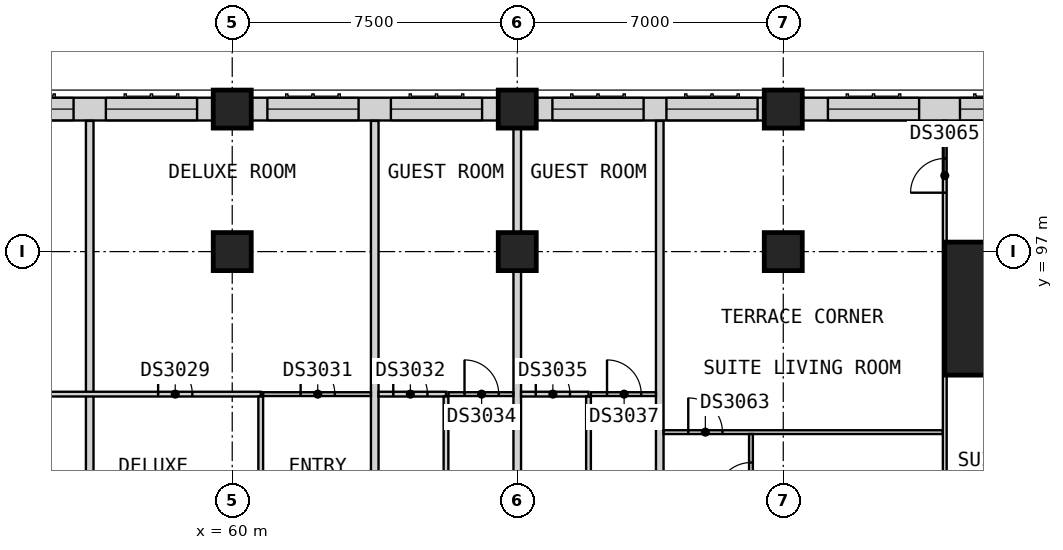
"""IFC4 building model, lengths in metres.
Left out: names, types, materials, properties, quantities, classifications, styles, units other than length and angle.
Written with IfcOpenShell. Run it as: python <this file> out.ifc"""

import sys

from ifc_helpers import new_model, si_unit, direction, frame, frame_2d, origin, origin_2d, place, context, subcontext, project, spatial, rectangle, extrude, element, fill, save


model = new_model("IFC4")
c1 = context("Model", 3, precision=1e-05, world=origin(), true_north=direction((0.0, 1.0)))
c2 = subcontext(c1, "Body", "Model", "MODEL_VIEW")
j1 = project(units=[si_unit("LENGTHUNIT", "METRE"), si_unit("PLANEANGLEUNIT", "RADIAN")], contexts=[c1])
p1 = place(None, origin())
s1 = spatial("IfcSite", under=j1, at=p1, CompositionType="ELEMENT")
p2 = place(p1, origin())
s2 = spatial("IfcBuilding", under=s1, at=p2, CompositionType="ELEMENT")
p3 = place(p2, frame((0.0, 0.0, 137.4)))
s3 = spatial("IfcBuildingStorey", under=s2, at=p3, CompositionType="ELEMENT", Elevation=137.4)
for number, where, z_axis, x_axis in (
    (1, (60.0, 100.75, 0.0), (0.0, 0.0, 1.0), (1.0, 0.0, 0.0)),
    (2, (67.5, 100.75, 0.0), (0.0, 0.0, 1.0), (1.0, 0.0, 0.0)),
    (3, (74.5, 100.75, 0.0), (0.0, 0.0, 1.0), (1.0, 0.0, 0.0)),
    (4, (60.0, 97.0, 0.0), (0.0, 0.0, 1.0), (1.0, 0.0, 0.0)),
    (5, (67.5, 97.0, 0.0), (0.0, 0.0, 1.0), (1.0, 0.0, 0.0)),
    (6, (74.5, 97.0, 0.0), (0.0, 0.0, 1.0), (1.0, 0.0, 0.0)),
):
    element("IfcColumn", number, at=place(p3, frame(where, z_axis=z_axis, x_axis=x_axis)), inside=s3, PredefinedType="COLUMN", context=c2, shape_type="SweptSolid", body=[
        extrude(rectangle(XDim=1.0, YDim=1.0, at=origin_2d()), origin(), (0.0, 0.0, 1.0), 3.6),
    ])
p4 = place(p3, frame((80.5, 95.5, 0.0), z_axis=(0.0, 0.0, 1.0), x_axis=(1.0, 0.0, 0.0)))
e7 = element("IfcColumn", 7, at=p4, inside=s3, PredefinedType="COLUMN", context=c2, shape_type="SweptSolid", body=[
    extrude(rectangle(XDim=3.5, YDim=3.5, at=origin_2d()), origin(), (0.0, 0.0, 1.0), 3.6),
])
p5 = place(p3, frame((82.25, 100.75, 0.0), z_axis=(0.0, 0.0, 1.0), x_axis=(-1.0, 0.0, 0.0)))
e8 = element("IfcWall", 8, at=p5, inside=s3, PredefinedType="SOLIDWALL", context=c2, shape_type="SweptSolid", body=[
    extrude(rectangle(XDim=7.25, YDim=0.6, at=frame_2d((3.625, 0.0))), origin(), (0.0, 0.0, 1.0), 2.85),
])
p6 = place(p5, frame((4.175, 0.0, 0.8)))
e9 = element("IfcOpeningElement", 9, at=p6, cuts=e8, PredefinedType="OPENING", context=c2, shape_type="SweptSolid", body=[
    extrude(rectangle(XDim=2.4, YDim=1.8, at=frame_2d((1.2, 0.9))), frame((0.0, 0.31, 0.0), z_axis=(0.0, -1.0, 0.0), x_axis=(1.0, 0.0, 0.0)), (0.0, 0.0, 1.0), 0.62),
])
p7 = place(p5, frame((1.3, 0.0, 0.8)))
e10 = element("IfcOpeningElement", 10, at=p7, cuts=e8, PredefinedType="OPENING", context=c2, shape_type="SweptSolid", body=[
    extrude(rectangle(XDim=1.8, YDim=1.8, at=frame_2d((0.9, 0.9))), frame((0.0, 0.31, 0.0), z_axis=(0.0, -1.0, 0.0), x_axis=(1.0, 0.0, 0.0)), (0.0, 0.0, 1.0), 0.62),
])
p8 = place(p3, frame((74.0, 100.75, 0.0), z_axis=(0.0, 0.0, 1.0), x_axis=(-1.0, 0.0, 0.0)))
e11 = element("IfcWall", 11, at=p8, inside=s3, PredefinedType="SOLIDWALL", context=c2, shape_type="SweptSolid", body=[
    extrude(rectangle(XDim=6.0, YDim=0.6, at=frame_2d((3.0, 0.0))), origin(), (0.0, 0.0, 1.0), 2.85),
])
p9 = place(p8, frame((3.175, 0.0, 0.8)))
e12 = element("IfcOpeningElement", 12, at=p9, cuts=e11, PredefinedType="OPENING", context=c2, shape_type="SweptSolid", body=[
    extrude(rectangle(XDim=2.4, YDim=1.8, at=frame_2d((1.2, 0.9))), frame((0.0, 0.31, 0.0), z_axis=(0.0, -1.0, 0.0), x_axis=(1.0, 0.0, 0.0)), (0.0, 0.0, 1.0), 0.62),
])
p10 = place(p8, frame((0.175, 0.0, 0.8)))
e13 = element("IfcOpeningElement", 13, at=p10, cuts=e11, PredefinedType="OPENING", context=c2, shape_type="SweptSolid", body=[
    extrude(rectangle(XDim=2.4, YDim=1.8, at=frame_2d((1.2, 0.9))), frame((0.0, 0.31, 0.0), z_axis=(0.0, -1.0, 0.0), x_axis=(1.0, 0.0, 0.0)), (0.0, 0.0, 1.0), 0.62),
])
p11 = place(p3, frame((67.0, 100.75, 0.0), z_axis=(0.0, 0.0, 1.0), x_axis=(-1.0, 0.0, 0.0)))
e14 = element("IfcWall", 14, at=p11, inside=s3, PredefinedType="SOLIDWALL", context=c2, shape_type="SweptSolid", body=[
    extrude(rectangle(XDim=6.5, YDim=0.6, at=frame_2d((3.25, 0.0))), origin(), (0.0, 0.0, 1.0), 2.85),
])
p12 = place(p11, frame((3.675, 0.0, 0.8)))
e15 = element("IfcOpeningElement", 15, at=p12, cuts=e14, PredefinedType="OPENING", context=c2, shape_type="SweptSolid", body=[
    extrude(rectangle(XDim=2.4, YDim=1.8, at=frame_2d((1.2, 0.9))), frame((0.0, 0.31, 0.0), z_axis=(0.0, -1.0, 0.0), x_axis=(1.0, 0.0, 0.0)), (0.0, 0.0, 1.0), 0.62),
])
p13 = place(p11, frame((0.425, 0.0, 0.8)))
e16 = element("IfcOpeningElement", 16, at=p13, cuts=e14, PredefinedType="OPENING", context=c2, shape_type="SweptSolid", body=[
    extrude(rectangle(XDim=2.4, YDim=1.8, at=frame_2d((1.2, 0.9))), frame((0.0, 0.31, 0.0), z_axis=(0.0, -1.0, 0.0), x_axis=(1.0, 0.0, 0.0)), (0.0, 0.0, 1.0), 0.62),
])
p14 = place(p3, frame((59.5, 100.75, 0.0), z_axis=(0.0, 0.0, 1.0), x_axis=(-1.0, 0.0, 0.0)))
e17 = element("IfcWall", 17, at=p14, inside=s3, PredefinedType="SOLIDWALL", context=c2, shape_type="SweptSolid", body=[
    extrude(rectangle(XDim=6.5, YDim=0.6, at=frame_2d((3.25, 0.0))), origin(), (0.0, 0.0, 1.0), 2.85),
])
p15 = place(p14, frame((3.675, 0.0, 0.8)))
e18 = element("IfcOpeningElement", 18, at=p15, cuts=e17, PredefinedType="OPENING", context=c2, shape_type="SweptSolid", body=[
    extrude(rectangle(XDim=2.4, YDim=1.8, at=frame_2d((1.2, 0.9))), frame((0.0, 0.31, 0.0), z_axis=(0.0, -1.0, 0.0), x_axis=(1.0, 0.0, 0.0)), (0.0, 0.0, 1.0), 0.62),
])
p16 = place(p14, frame((0.425, 0.0, 0.8)))
e19 = element("IfcOpeningElement", 19, at=p16, cuts=e17, PredefinedType="OPENING", context=c2, shape_type="SweptSolid", body=[
    extrude(rectangle(XDim=2.4, YDim=1.8, at=frame_2d((1.2, 0.9))), frame((0.0, 0.31, 0.0), z_axis=(0.0, -1.0, 0.0), x_axis=(1.0, 0.0, 0.0)), (0.0, 0.0, 1.0), 0.62),
])
for number, where, z_axis, x_axis in (
    (20, (56.25, 88.725, 0.0), (0.0, 0.0, 1.0), (0.0, 1.0, 0.0)),
    (21, (63.75, 88.725, 0.0), (0.0, 0.0, 1.0), (0.0, 1.0, 0.0)),
):
    element("IfcWall", number, at=place(p3, frame(where, z_axis=z_axis, x_axis=x_axis)), inside=s3, PredefinedType="PARTITIONING", context=c2, shape_type="SweptSolid", body=[
        extrude(rectangle(XDim=11.715, YDim=0.2, at=frame_2d((5.857, 0.0))), origin(), (0.0, 0.0, 1.0), 3.35),
    ])
p17 = place(p3, frame((67.5, 88.725, 0.0), z_axis=(0.0, 0.0, 1.0), x_axis=(0.0, 1.0, 0.0)))
e22 = element("IfcWall", 22, at=p17, inside=s3, PredefinedType="PARTITIONING", context=c2, shape_type="SweptSolid", body=[
    extrude(rectangle(XDim=12.525, YDim=0.2, at=frame_2d((6.262, 0.0))), origin(), (0.0, 0.0, 1.0), 3.35),
])
p18 = place(p3, frame((71.25, 88.725, 0.0), z_axis=(0.0, 0.0, 1.0), x_axis=(0.0, 1.0, 0.0)))
e23 = element("IfcWall", 23, at=p18, inside=s3, PredefinedType="PARTITIONING", context=c2, shape_type="SweptSolid", body=[
    extrude(rectangle(XDim=11.715, YDim=0.2, at=frame_2d((5.857, 0.0))), origin(), (0.0, 0.0, 1.0), 3.35),
])
p19 = place(p3, frame((71.35, 92.25, 0.0), z_axis=(0.0, 0.0, 1.0), x_axis=(1.0, 0.0, 0.0)))
e24 = element("IfcWall", 24, at=p19, inside=s3, PredefinedType="PARTITIONING", context=c2, shape_type="SweptSolid", body=[
    extrude(rectangle(XDim=7.35, YDim=0.1, at=frame_2d((3.675, 0.0))), origin(), (0.0, 0.0, 1.0), 3.35),
])
p20 = place(p19, frame((0.65, 0.0, 0.0)))
e25 = element("IfcOpeningElement", 25, at=p20, cuts=e24, PredefinedType="OPENING", context=c2, shape_type="SweptSolid", body=[
    extrude(rectangle(XDim=0.9, YDim=2.1, at=frame_2d((0.45, 1.05))), frame((0.0, 0.06, 0.0), z_axis=(0.0, -1.0, 0.0), x_axis=(1.0, 0.0, 0.0)), (0.0, 0.0, 1.0), 0.12),
])
p21 = place(p3, frame((60.812, 93.25, 0.0), z_axis=(0.0, 0.0, 1.0), x_axis=(1.0, 0.0, 0.0)))
e26 = element("IfcWall", 26, at=p21, inside=s3, PredefinedType="PARTITIONING", context=c2, shape_type="SweptSolid", body=[
    extrude(rectangle(XDim=2.837, YDim=0.1, at=frame_2d((1.419, 0.0))), origin(), (0.0, 0.0, 1.0), 3.35),
])
p22 = place(p21, frame((0.988, 0.0, 0.0)))
e27 = element("IfcOpeningElement", 27, at=p22, cuts=e26, PredefinedType="OPENING", context=c2, shape_type="SweptSolid", body=[
    extrude(rectangle(XDim=0.9, YDim=2.1, at=frame_2d((0.45, 1.05))), frame((0.0, 0.06, 0.0), z_axis=(0.0, -1.0, 0.0), x_axis=(1.0, 0.0, 0.0)), (0.0, 0.0, 1.0), 0.12),
])
p23 = place(p3, frame((65.688, 93.25, 0.0), z_axis=(0.0, 0.0, 1.0), x_axis=(1.0, 0.0, 0.0)))
e28 = element("IfcWall", 28, at=p23, inside=s3, PredefinedType="PARTITIONING", context=c2, shape_type="SweptSolid", body=[
    extrude(rectangle(XDim=1.712, YDim=0.1, at=frame_2d((0.856, 0.0))), origin(), (0.0, 0.0, 1.0), 3.35),
])
p24 = place(p23, frame((0.425, 0.0, 0.0)))
e29 = element("IfcOpeningElement", 29, at=p24, cuts=e28, PredefinedType="OPENING", context=c2, shape_type="SweptSolid", body=[
    extrude(rectangle(XDim=0.9, YDim=2.1, at=frame_2d((0.45, 1.05))), frame((0.0, 0.06, 0.0), z_axis=(0.0, -1.0, 0.0), x_axis=(1.0, 0.0, 0.0)), (0.0, 0.0, 1.0), 0.12),
])
p25 = place(p3, frame((69.438, 93.25, 0.0), z_axis=(0.0, 0.0, 1.0), x_axis=(1.0, 0.0, 0.0)))
e30 = element("IfcWall", 30, at=p25, inside=s3, PredefinedType="PARTITIONING", context=c2, shape_type="SweptSolid", body=[
    extrude(rectangle(XDim=1.712, YDim=0.1, at=frame_2d((0.856, 0.0))), origin(), (0.0, 0.0, 1.0), 3.35),
])
p26 = place(p25, frame((0.425, 0.0, 0.0)))
e31 = element("IfcOpeningElement", 31, at=p26, cuts=e30, PredefinedType="OPENING", context=c2, shape_type="SweptSolid", body=[
    extrude(rectangle(XDim=0.9, YDim=2.1, at=frame_2d((0.45, 1.05))), frame((0.0, 0.06, 0.0), z_axis=(0.0, -1.0, 0.0), x_axis=(1.0, 0.0, 0.0)), (0.0, 0.0, 1.0), 0.12),
])
p27 = place(p3, frame((78.8, 96.75, 0.0), z_axis=(0.0, 0.0, 1.0), x_axis=(1.0, 0.0, 0.0)))
e32 = element("IfcWall", 32, at=p27, inside=s3, PredefinedType="PARTITIONING", context=c2, shape_type="SweptSolid", body=[
    extrude(rectangle(XDim=3.44, YDim=0.1, at=frame_2d((1.72, 0.0))), origin(), (0.0, 0.0, 1.0), 3.35),
])
p28 = place(p3, frame((73.65, 88.725, 0.0), z_axis=(0.0, 0.0, 1.0), x_axis=(0.0, 1.0, 0.0)))
e33 = element("IfcWall", 33, at=p28, inside=s3, PredefinedType="PARTITIONING", context=c2, shape_type="SweptSolid", body=[
    extrude(rectangle(XDim=3.475, YDim=0.1, at=frame_2d((1.737, 0.0))), origin(), (0.0, 0.0, 1.0), 3.35),
])
p29 = place(p28, frame((1.825, 0.0, 0.0)))
e34 = element("IfcOpeningElement", 34, at=p29, cuts=e33, PredefinedType="OPENING", context=c2, shape_type="SweptSolid", body=[
    extrude(rectangle(XDim=0.9, YDim=2.1, at=frame_2d((0.45, 1.05))), frame((0.0, 0.06, 0.0), z_axis=(0.0, -1.0, 0.0), x_axis=(1.0, 0.0, 0.0)), (0.0, 0.0, 1.0), 0.12),
])
p30 = place(p3, frame((78.75, 88.712, 0.0), z_axis=(0.0, 0.0, 1.0), x_axis=(0.0, 1.0, 0.0)))
e35 = element("IfcWall", 35, at=p30, inside=s3, PredefinedType="PARTITIONING", context=c2, shape_type="SweptSolid", body=[
    extrude(rectangle(XDim=11.728, YDim=0.1, at=frame_2d((5.864, 0.0))), origin(), (0.0, 0.0, 1.0), 3.35),
])
p31 = place(p30, frame((9.837, 0.0, 0.0)))
e36 = element("IfcOpeningElement", 36, at=p31, cuts=e35, PredefinedType="OPENING", context=c2, shape_type="SweptSolid", body=[
    extrude(rectangle(XDim=0.9, YDim=2.1, at=frame_2d((0.45, 1.05))), frame((0.0, 0.06, 0.0), z_axis=(0.0, -1.0, 0.0), x_axis=(1.0, 0.0, 0.0)), (0.0, 0.0, 1.0), 0.12),
])
p32 = place(p30, frame((1.288, 0.0, 0.0)))
e37 = element("IfcOpeningElement", 37, at=p32, cuts=e35, PredefinedType="OPENING", context=c2, shape_type="SweptSolid", body=[
    extrude(rectangle(XDim=0.9, YDim=2.1, at=frame_2d((0.45, 1.05))), frame((0.0, 0.06, 0.0), z_axis=(0.0, -1.0, 0.0), x_axis=(1.0, 0.0, 0.0)), (0.0, 0.0, 1.0), 0.12),
])
p33 = place(p3, frame((49.5, 93.25, 0.0), z_axis=(0.0, 0.0, 1.0), x_axis=(1.0, 0.0, 0.0)))
e38 = element("IfcWall", 38, at=p33, inside=s3, PredefinedType="PARTITIONING", context=c2, shape_type="SweptSolid", body=[
    extrude(rectangle(XDim=11.25, YDim=0.125, at=frame_2d((5.625, 0.0))), origin(), (0.0, 0.0, 1.0), 3.35),
])
p34 = place(p33, frame((4.425, 0.0, 0.0)))
e39 = element("IfcOpeningElement", 39, at=p34, cuts=e38, PredefinedType="OPENING", context=c2, shape_type="SweptSolid", body=[
    extrude(rectangle(XDim=0.9, YDim=2.1, at=frame_2d((0.45, 1.05))), frame((0.0, 0.073, 0.0), z_axis=(0.0, -1.0, 0.0), x_axis=(1.0, 0.0, 0.0)), (0.0, 0.0, 1.0), 0.145),
])
p35 = place(p33, frame((8.55, 0.0, 0.0)))
e40 = element("IfcOpeningElement", 40, at=p35, cuts=e38, PredefinedType="OPENING", context=c2, shape_type="SweptSolid", body=[
    extrude(rectangle(XDim=0.9, YDim=2.1, at=frame_2d((0.45, 1.05))), frame((0.0, 0.073, 0.0), z_axis=(0.0, -1.0, 0.0), x_axis=(1.0, 0.0, 0.0)), (0.0, 0.0, 1.0), 0.145),
])
p36 = place(p3, frame((63.85, 93.25, 0.0), z_axis=(0.0, 0.0, 1.0), x_axis=(1.0, 0.0, 0.0)))
e41 = element("IfcWall", 41, at=p36, inside=s3, PredefinedType="PARTITIONING", context=c2, shape_type="SweptSolid", body=[
    extrude(rectangle(XDim=1.775, YDim=0.125, at=frame_2d((0.887, 0.0))), origin(), (0.0, 0.0, 1.0), 3.35),
])
p37 = place(p36, frame((0.387, 0.0, 0.0)))
e42 = element("IfcOpeningElement", 42, at=p37, cuts=e41, PredefinedType="OPENING", context=c2, shape_type="SweptSolid", body=[
    extrude(rectangle(XDim=0.9, YDim=2.1, at=frame_2d((0.45, 1.05))), frame((0.0, 0.073, 0.0), z_axis=(0.0, -1.0, 0.0), x_axis=(1.0, 0.0, 0.0)), (0.0, 0.0, 1.0), 0.145),
])
p38 = place(p3, frame((67.6, 93.25, 0.0), z_axis=(0.0, 0.0, 1.0), x_axis=(1.0, 0.0, 0.0)))
e43 = element("IfcWall", 43, at=p38, inside=s3, PredefinedType="PARTITIONING", context=c2, shape_type="SweptSolid", body=[
    extrude(rectangle(XDim=1.775, YDim=0.125, at=frame_2d((0.887, 0.0))), origin(), (0.0, 0.0, 1.0), 3.35),
])
p39 = place(p38, frame((0.387, 0.0, 0.0)))
e44 = element("IfcOpeningElement", 44, at=p39, cuts=e43, PredefinedType="OPENING", context=c2, shape_type="SweptSolid", body=[
    extrude(rectangle(XDim=0.9, YDim=2.1, at=frame_2d((0.45, 1.05))), frame((0.0, 0.073, 0.0), z_axis=(0.0, -1.0, 0.0), x_axis=(1.0, 0.0, 0.0)), (0.0, 0.0, 1.0), 0.145),
])
for number, where, z_axis, x_axis in (
    (45, (60.75, 88.725, 0.0), (0.0, 0.0, 1.0), (0.0, 1.0, 0.0)),
    (46, (65.625, 88.725, 0.0), (0.0, 0.0, 1.0), (0.0, 1.0, 0.0)),
    (47, (69.375, 88.725, 0.0), (0.0, 0.0, 1.0), (0.0, 1.0, 0.0)),
):
    element("IfcWall", number, at=place(p3, frame(where, z_axis=z_axis, x_axis=x_axis)), inside=s3, PredefinedType="PARTITIONING", context=c2, shape_type="SweptSolid", body=[
        extrude(rectangle(XDim=4.462, YDim=0.125, at=frame_2d((2.231, 0.0))), origin(), (0.0, 0.0, 1.0), 3.35),
    ])
p40 = place(p6, origin())
e48 = element("IfcWindow", 48, at=p40, inside=s3, PartitioningType="SINGLE_PANEL", PredefinedType="WINDOW", context=c2, shape_type="SweptSolid", body=[
    extrude(rectangle(XDim=2.4, YDim=1.8, at=frame_2d((1.2, 0.9))), frame((0.0, -0.07, 0.0), z_axis=(0.0, -1.0, 0.0), x_axis=(1.0, 0.0, 0.0)), (0.0, 0.0, 1.0), 0.06),
])
fill(e9, e48)
p41 = place(p7, origin())
e49 = element("IfcWindow", 49, at=p41, inside=s3, PartitioningType="SINGLE_PANEL", PredefinedType="WINDOW", context=c2, shape_type="SweptSolid", body=[
    extrude(rectangle(XDim=1.8, YDim=1.8, at=frame_2d((0.9, 0.9))), frame((0.0, -0.07, 0.0), z_axis=(0.0, -1.0, 0.0), x_axis=(1.0, 0.0, 0.0)), (0.0, 0.0, 1.0), 0.06),
])
fill(e10, e49)
p42 = place(p9, origin())
e50 = element("IfcWindow", 50, at=p42, inside=s3, PartitioningType="SINGLE_PANEL", PredefinedType="WINDOW", context=c2, shape_type="SweptSolid", body=[
    extrude(rectangle(XDim=2.4, YDim=1.8, at=frame_2d((1.2, 0.9))), frame((0.0, -0.07, 0.0), z_axis=(0.0, -1.0, 0.0), x_axis=(1.0, 0.0, 0.0)), (0.0, 0.0, 1.0), 0.06),
])
fill(e12, e50)
p43 = place(p10, origin())
e51 = element("IfcWindow", 51, at=p43, inside=s3, PartitioningType="SINGLE_PANEL", PredefinedType="WINDOW", context=c2, shape_type="SweptSolid", body=[
    extrude(rectangle(XDim=2.4, YDim=1.8, at=frame_2d((1.2, 0.9))), frame((0.0, -0.07, 0.0), z_axis=(0.0, -1.0, 0.0), x_axis=(1.0, 0.0, 0.0)), (0.0, 0.0, 1.0), 0.06),
])
fill(e13, e51)
p44 = place(p12, origin())
e52 = element("IfcWindow", 52, at=p44, inside=s3, PartitioningType="SINGLE_PANEL", PredefinedType="WINDOW", context=c2, shape_type="SweptSolid", body=[
    extrude(rectangle(XDim=2.4, YDim=1.8, at=frame_2d((1.2, 0.9))), frame((0.0, -0.07, 0.0), z_axis=(0.0, -1.0, 0.0), x_axis=(1.0, 0.0, 0.0)), (0.0, 0.0, 1.0), 0.06),
])
fill(e15, e52)
p45 = place(p13, origin())
e53 = element("IfcWindow", 53, at=p45, inside=s3, PartitioningType="SINGLE_PANEL", PredefinedType="WINDOW", context=c2, shape_type="SweptSolid", body=[
    extrude(rectangle(XDim=2.4, YDim=1.8, at=frame_2d((1.2, 0.9))), frame((0.0, -0.07, 0.0), z_axis=(0.0, -1.0, 0.0), x_axis=(1.0, 0.0, 0.0)), (0.0, 0.0, 1.0), 0.06),
])
fill(e16, e53)
p46 = place(p15, origin())
e54 = element("IfcWindow", 54, at=p46, inside=s3, PartitioningType="SINGLE_PANEL", PredefinedType="WINDOW", context=c2, shape_type="SweptSolid", body=[
    extrude(rectangle(XDim=2.4, YDim=1.8, at=frame_2d((1.2, 0.9))), frame((0.0, -0.07, 0.0), z_axis=(0.0, -1.0, 0.0), x_axis=(1.0, 0.0, 0.0)), (0.0, 0.0, 1.0), 0.06),
])
fill(e18, e54)
p47 = place(p16, origin())
e55 = element("IfcWindow", 55, at=p47, inside=s3, PartitioningType="SINGLE_PANEL", PredefinedType="WINDOW", context=c2, shape_type="SweptSolid", body=[
    extrude(rectangle(XDim=2.4, YDim=1.8, at=frame_2d((1.2, 0.9))), frame((0.0, -0.07, 0.0), z_axis=(0.0, -1.0, 0.0), x_axis=(1.0, 0.0, 0.0)), (0.0, 0.0, 1.0), 0.06),
])
fill(e19, e55)
p48 = place(p35, origin())
e56 = element("IfcDoor", 56, at=p48, inside=s3, OperationType="SINGLE_SWING_RIGHT", PredefinedType="DOOR", context=c2, shape_type="SweptSolid", body=[
    extrude(rectangle(XDim=0.9, YDim=2.1, at=frame_2d((0.45, 1.05))), frame((0.0, 0.025, 0.0), z_axis=(0.0, -1.0, 0.0), x_axis=(1.0, 0.0, 0.0)), (0.0, 0.0, 1.0), 0.05),
])
fill(e40, e56)
p49 = place(p22, origin())
e57 = element("IfcDoor", 57, at=p49, inside=s3, OperationType="SINGLE_SWING_RIGHT", PredefinedType="DOOR", context=c2, shape_type="SweptSolid", body=[
    extrude(rectangle(XDim=0.9, YDim=2.1, at=frame_2d((0.45, 1.05))), frame((0.0, 0.025, 0.0), z_axis=(0.0, -1.0, 0.0), x_axis=(1.0, 0.0, 0.0)), (0.0, 0.0, 1.0), 0.05),
])
fill(e27, e57)
p50 = place(p37, origin())
e58 = element("IfcDoor", 58, at=p50, inside=s3, OperationType="SINGLE_SWING_RIGHT", PredefinedType="DOOR", context=c2, shape_type="SweptSolid", body=[
    extrude(rectangle(XDim=0.9, YDim=2.1, at=frame_2d((0.45, 1.05))), frame((0.0, 0.025, 0.0), z_axis=(0.0, -1.0, 0.0), x_axis=(1.0, 0.0, 0.0)), (0.0, 0.0, 1.0), 0.05),
])
fill(e42, e58)
p51 = place(p24, origin())
e59 = element("IfcDoor", 59, at=p51, inside=s3, OperationType="SINGLE_SWING_RIGHT", PredefinedType="DOOR", context=c2, shape_type="SweptSolid", body=[
    extrude(rectangle(XDim=0.9, YDim=2.1, at=frame_2d((0.45, 1.05))), frame((0.0, 0.025, 0.0), z_axis=(0.0, -1.0, 0.0), x_axis=(1.0, 0.0, 0.0)), (0.0, 0.0, 1.0), 0.05),
])
fill(e29, e59)
p52 = place(p39, origin())
e60 = element("IfcDoor", 60, at=p52, inside=s3, OperationType="SINGLE_SWING_RIGHT", PredefinedType="DOOR", context=c2, shape_type="SweptSolid", body=[
    extrude(rectangle(XDim=0.9, YDim=2.1, at=frame_2d((0.45, 1.05))), frame((0.0, 0.025, 0.0), z_axis=(0.0, -1.0, 0.0), x_axis=(1.0, 0.0, 0.0)), (0.0, 0.0, 1.0), 0.05),
])
fill(e44, e60)
p53 = place(p26, origin())
e61 = element("IfcDoor", 61, at=p53, inside=s3, OperationType="SINGLE_SWING_RIGHT", PredefinedType="DOOR", context=c2, shape_type="SweptSolid", body=[
    extrude(rectangle(XDim=0.9, YDim=2.1, at=frame_2d((0.45, 1.05))), frame((0.0, 0.025, 0.0), z_axis=(0.0, -1.0, 0.0), x_axis=(1.0, 0.0, 0.0)), (0.0, 0.0, 1.0), 0.05),
])
fill(e31, e61)
p54 = place(p20, origin())
e62 = element("IfcDoor", 62, at=p54, inside=s3, OperationType="SINGLE_SWING_LEFT", PredefinedType="DOOR", context=c2, shape_type="SweptSolid", body=[
    extrude(rectangle(XDim=0.9, YDim=2.1, at=frame_2d((0.45, 1.05))), frame((0.0, 0.025, 0.0), z_axis=(0.0, -1.0, 0.0), x_axis=(1.0, 0.0, 0.0)), (0.0, 0.0, 1.0), 0.05),
])
fill(e25, e62)
p55 = place(p29, origin())
e63 = element("IfcDoor", 63, at=p55, inside=s3, OperationType="SINGLE_SWING_RIGHT", PredefinedType="DOOR", context=c2, shape_type="SweptSolid", body=[
    extrude(rectangle(XDim=0.9, YDim=2.1, at=frame_2d((0.45, 1.05))), frame((0.0, 0.025, 0.0), z_axis=(0.0, -1.0, 0.0), x_axis=(1.0, 0.0, 0.0)), (0.0, 0.0, 1.0), 0.05),
])
fill(e34, e63)
p56 = place(p31, origin())
e64 = element("IfcDoor", 64, at=p56, inside=s3, OperationType="SINGLE_SWING_LEFT", PredefinedType="DOOR", context=c2, shape_type="SweptSolid", body=[
    extrude(rectangle(XDim=0.9, YDim=2.1, at=frame_2d((0.45, 1.05))), frame((0.0, 0.025, 0.0), z_axis=(0.0, -1.0, 0.0), x_axis=(1.0, 0.0, 0.0)), (0.0, 0.0, 1.0), 0.05),
])
fill(e36, e64)
save(model, sys.argv[1])
